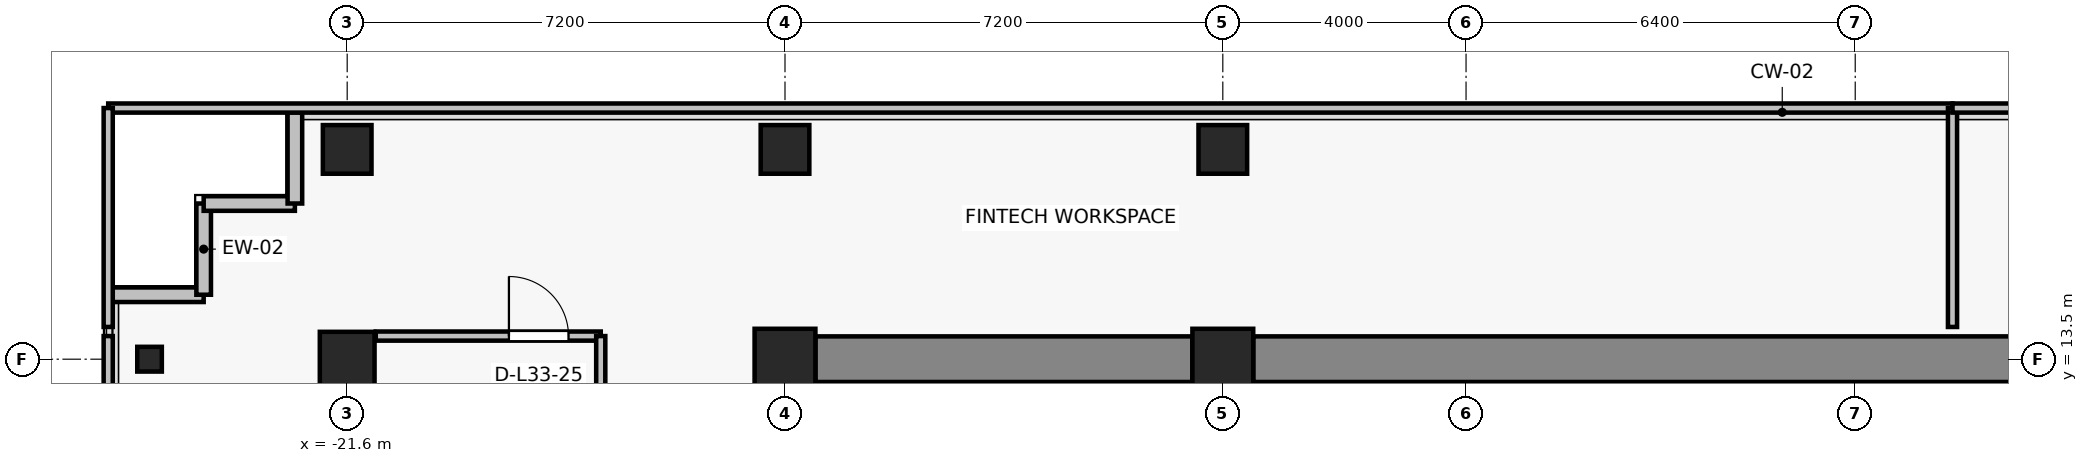
"""IFC4 building model, lengths in metres.
Left out: names, types, materials, properties, quantities, classifications, styles, units other than length and angle.
Written with IfcOpenShell. Run it as: python <this file> out.ifc"""

import sys

from ifc_helpers import new_model, si_unit, direction, frame, frame_2d, origin, origin_2d, place, context, subcontext, project, spatial, rectangle, i_section, extrude, source, transform, mapped, element, fill, save


model = new_model("IFC4")
c1 = context("Model", 3, precision=1e-05, world=origin(), true_north=direction((0.0, 1.0)))
c2 = subcontext(c1, "Body", "Model", "MODEL_VIEW")
j1 = project(units=[si_unit("LENGTHUNIT", "METRE"), si_unit("PLANEANGLEUNIT", "RADIAN")], contexts=[c1])
p1 = place(None, origin())
s1 = spatial("IfcSite", under=j1, at=p1, CompositionType="ELEMENT")
p2 = place(p1, origin())
s2 = spatial("IfcBuilding", under=s1, at=p2, CompositionType="ELEMENT")
p3 = place(p2, frame((0.0, 0.0, 119.8)))
s3 = spatial("IfcBuildingStorey", under=s2, at=p3, CompositionType="ELEMENT", Elevation=119.8)
for number, where, z_axis, x_axis in (
    (1, (-14.4, 13.5, 0.0), (0.0, 0.0, 1.0), (1.0, 0.0, 0.0)),
    (2, (-7.2, 13.5, 0.0), (0.0, 0.0, 1.0), (1.0, 0.0, 0.0)),
):
    element("IfcColumn", number, at=place(p3, frame(where, z_axis=z_axis, x_axis=x_axis)), inside=s3, PredefinedType="COLUMN", context=c2, shape_type="SweptSolid", body=[
        extrude(rectangle(XDim=1.0, YDim=1.0, at=origin_2d()), origin(), (0.0, 0.0, 1.0), 3.3),
    ])
p4 = place(p3, frame((-21.6, 13.5, 0.0), z_axis=(0.0, 0.0, 1.0), x_axis=(1.0, 0.0, 0.0)))
e3 = element("IfcColumn", 3, at=p4, inside=s3, PredefinedType="COLUMN", context=c2, shape_type="SweptSolid", body=[
    extrude(rectangle(XDim=0.9, YDim=0.9, at=origin_2d()), origin(), (0.0, 0.0, 1.0), 3.3),
])
for number, where, z_axis, x_axis in (
    (4, (-14.4, 16.95, 0.0), (0.0, 0.0, 1.0), (1.0, 0.0, 0.0)),
    (5, (-7.2, 16.95, 0.0), (0.0, 0.0, 1.0), (1.0, 0.0, 0.0)),
    (6, (-21.6, 16.95, 0.0), (0.0, 0.0, 1.0), (1.0, 0.0, 0.0)),
):
    element("IfcColumn", number, at=place(p3, frame(where, z_axis=z_axis, x_axis=x_axis)), inside=s3, PredefinedType="COLUMN", context=c2, shape_type="SweptSolid", body=[
        extrude(rectangle(XDim=0.8, YDim=0.8, at=origin_2d()), origin(), (0.0, 0.0, 1.0), 3.3),
    ])
p5 = place(p3, frame((-24.85, 13.5, 0.0), z_axis=(0.0, 0.0, 1.0), x_axis=(1.0, 0.0, 0.0)))
e7 = element("IfcColumn", 7, at=p5, inside=s3, PredefinedType="COLUMN", context=c2, shape_type="SweptSolid", body=[
    extrude(i_section(OverallWidth=0.404, OverallDepth=0.407, WebThickness=0.022, FlangeThickness=0.032, FilletRadius=0.015, at=origin_2d()), origin(), (0.0, 0.0, 1.0), 3.3),
])
p6 = place(p3, frame((-13.9, 13.5, 0.0), z_axis=(0.0, 0.0, 1.0), x_axis=(1.0, 0.0, 0.0)))
e8 = element("IfcWall", 8, at=p6, inside=s3, PredefinedType="SHEAR", context=c2, shape_type="SweptSolid", body=[
    extrude(rectangle(XDim=6.2, YDim=0.75, at=frame_2d((3.1, 0.0))), origin(), (0.0, 0.0, 1.0), 3.075),
])
p7 = place(p3, frame((-6.7, 13.5, 0.0), z_axis=(0.0, 0.0, 1.0), x_axis=(1.0, 0.0, 0.0)))
e9 = element("IfcWall", 9, at=p7, inside=s3, PredefinedType="SHEAR", context=c2, shape_type="SweptSolid", body=[
    extrude(rectangle(XDim=13.4, YDim=0.75, at=frame_2d((6.7, 0.0))), origin(), (0.0, 0.0, 1.0), 3.075),
])
for number, where, z_axis, x_axis in (
    (10, (-23.96, 14.56, 0.0), (0.0, 0.0, 1.0), (-1.0, 0.0, 0.0)),
    (11, (-23.96, 16.06, 0.0), (0.0, 0.0, 1.0), (0.0, -1.0, 0.0)),
    (12, (-22.46, 16.06, 0.0), (0.0, 0.0, 1.0), (-1.0, 0.0, 0.0)),
):
    element("IfcWall", number, at=place(p3, frame(where, z_axis=z_axis, x_axis=x_axis)), inside=s3, PredefinedType="SOLIDWALL", context=c2, shape_type="SweptSolid", body=[
        extrude(rectangle(XDim=1.5, YDim=0.24, at=frame_2d((0.75, 0.0))), origin(), (0.0, 0.0, 1.0), 3.075),
    ])
p8 = place(p3, frame((-22.46, 17.56, 0.0), z_axis=(0.0, 0.0, 1.0), x_axis=(0.0, -1.0, 0.0)))
e13 = element("IfcWall", 13, at=p8, inside=s3, PredefinedType="SOLIDWALL", context=c2, shape_type="SweptSolid", body=[
    extrude(rectangle(XDim=1.5, YDim=0.24, at=frame_2d((0.75, 0.0))), origin(), (0.0, 0.0, 1.0), 2.565),
])
p9 = place(p3, frame((-21.13, 13.88, 0.0), z_axis=(0.0, 0.0, 1.0), x_axis=(1.0, 0.0, 0.0)))
e14 = element("IfcWall", 14, at=p9, inside=s3, PredefinedType="PARTITIONING", context=c2, shape_type="SweptSolid", body=[
    extrude(rectangle(XDim=3.7, YDim=0.15, at=frame_2d((1.85, 0.0))), origin(), (0.0, 0.0, 1.0), 3.075),
])
p10 = place(p9, frame((2.19, 0.0, 0.0)))
e15 = element("IfcOpeningElement", 15, at=p10, cuts=e14, PredefinedType="OPENING", context=c2, shape_type="SweptSolid", body=[
    extrude(rectangle(XDim=0.98, YDim=2.15, at=frame_2d((0.49, 1.075))), frame((0.0, 0.085, 0.0), z_axis=(0.0, -1.0, 0.0), x_axis=(1.0, 0.0, 0.0)), (0.0, 0.0, 1.0), 0.17),
])
p11 = place(p3, frame((-25.53, 10.146, 0.0), z_axis=(0.0, 0.0, 1.0), x_axis=(0.0, 1.0, 0.0)))
e16 = element("IfcWall", 16, at=p11, inside=s3, PredefinedType="PARTITIONING", context=c2, shape_type="SweptSolid", body=[
    extrude(rectangle(XDim=3.734, YDim=0.15, at=frame_2d((1.867, 0.0))), origin(), (0.0, 0.0, 1.0), 3.075),
])
p12 = place(p3, frame((-17.43, 13.88, 0.0), z_axis=(0.0, 0.0, 1.0), x_axis=(0.0, -1.0, 0.0)))
e17 = element("IfcWall", 17, at=p12, inside=s3, PredefinedType="PARTITIONING", context=c2, shape_type="SweptSolid", body=[
    extrude(rectangle(XDim=3.734, YDim=0.15, at=frame_2d((1.867, 0.0))), origin(), (0.0, 0.0, 1.0), 2.515),
])
p13 = place(p12, frame((1.377, 0.0, 0.0)))
e18 = element("IfcOpeningElement", 18, at=p13, cuts=e17, PredefinedType="OPENING", context=c2, shape_type="SweptSolid", body=[
    extrude(rectangle(XDim=0.98, YDim=2.15, at=frame_2d((0.49, 1.075))), frame((0.0, 0.085, 0.0), z_axis=(0.0, -1.0, 0.0), x_axis=(1.0, 0.0, 0.0)), (0.0, 0.0, 1.0), 0.17),
])
p14 = place(p3, frame((-25.53, 17.63, 0.0), z_axis=(0.0, 0.0, 1.0), x_axis=(1.0, 0.0, 0.0)))
e19 = element("IfcWall", 19, at=p14, inside=s3, PredefinedType="PARTITIONING", context=c2, shape_type="SweptSolid", body=[
    extrude(rectangle(XDim=30.33, YDim=0.15, at=frame_2d((15.165, 0.0))), origin(), (0.0, 0.0, 1.0), 3.075),
])
p15 = place(p3, frame((-25.53, 14.03, 0.0), z_axis=(0.0, 0.0, 1.0), x_axis=(0.0, 1.0, 0.0)))
e20 = element("IfcWall", 20, at=p15, inside=s3, PredefinedType="PARTITIONING", context=c2, shape_type="SweptSolid", body=[
    extrude(rectangle(XDim=3.6, YDim=0.15, at=frame_2d((1.8, 0.0))), origin(), (0.0, 0.0, 1.0), 3.075),
])
p16 = place(p3, frame((4.8, 17.63, 0.0), z_axis=(0.0, 0.0, 1.0), x_axis=(0.0, -1.0, 0.0)))
e21 = element("IfcWall", 21, at=p16, inside=s3, PredefinedType="PARTITIONING", context=c2, shape_type="SweptSolid", body=[
    extrude(rectangle(XDim=3.6, YDim=0.15, at=frame_2d((1.8, 0.0))), origin(), (0.0, 0.0, 1.0), 2.565),
])
p17 = place(p3, frame((4.8, 17.63, 0.0), z_axis=(0.0, 0.0, 1.0), x_axis=(1.0, 0.0, 0.0)))
e22 = element("IfcWall", 22, at=p17, inside=s3, PredefinedType="PARTITIONING", context=c2, shape_type="SweptSolid", body=[
    extrude(rectangle(XDim=24.73, YDim=0.15, at=frame_2d((12.365, 0.0))), origin(), (0.0, 0.0, 1.0), 3.075),
])
m1 = source(origin(), c2, "Body", "SweptSolid", [
    extrude(rectangle(XDim=0.98, YDim=2.15, at=frame_2d((0.49, 1.075))), frame((0.0, 0.025, 0.0), z_axis=(0.0, -1.0, 0.0), x_axis=(1.0, 0.0, 0.0)), (0.0, 0.0, 1.0), 0.05),
])
p18 = place(p10, origin())
e23 = element("IfcDoor", 23, at=p18, inside=s3, OperationType="SINGLE_SWING_LEFT", PredefinedType="DOOR", context=c2, shape_type="MappedRepresentation", body=[
    mapped(m1, transform((0.0, 0.0, 0.0), x_axis=(1.0, 0.0, 0.0), y_axis=(0.0, 1.0, 0.0), z_axis=(0.0, 0.0, 1.0), scale=1.0)),
])
fill(e15, e23)
save(model, sys.argv[1])
